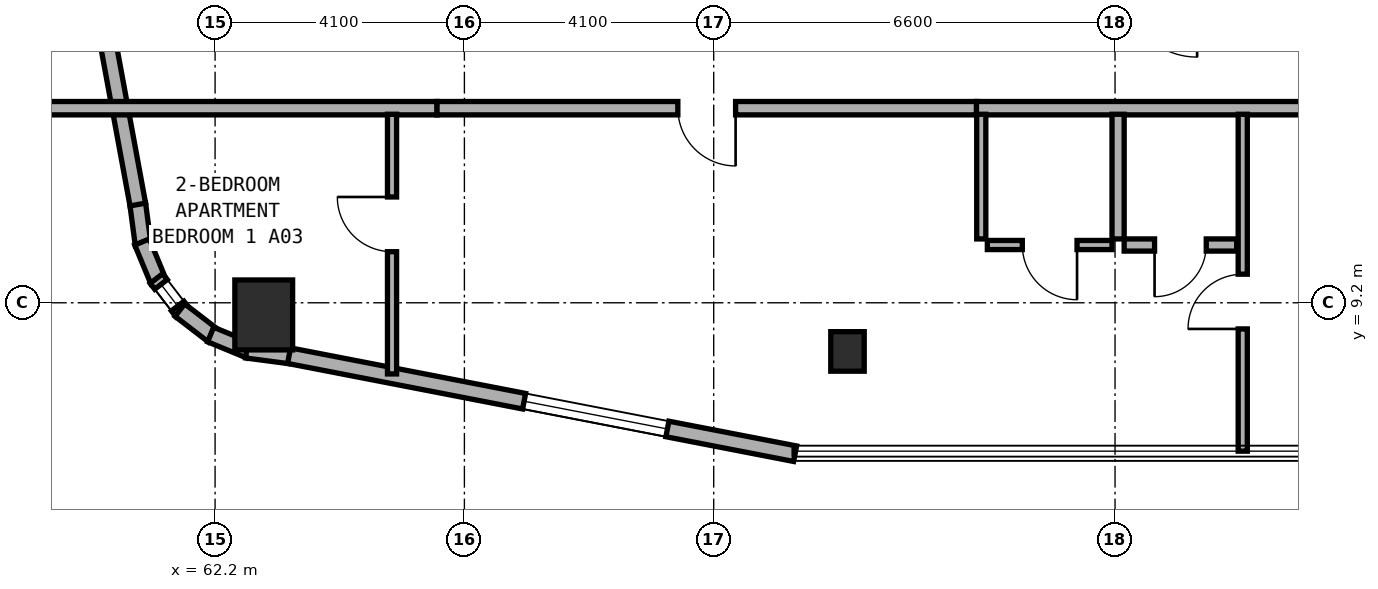
"""IFC4 building model, lengths in metres.
Left out: names, types, materials, properties, quantities, classifications, styles, units other than length and angle.
Written with IfcOpenShell. Run it as: python <this file> out.ifc"""

import sys

from ifc_helpers import new_model, si_unit, direction, frame, frame_2d, origin, origin_2d, place, context, subcontext, project, spatial, rectangle, extrude, element, fill, save


model = new_model("IFC4")
c1 = context("Model", 3, precision=1e-05, world=origin(), true_north=direction((0.0, 1.0)))
c2 = subcontext(c1, "Body", "Model", "MODEL_VIEW")
j1 = project(units=[si_unit("LENGTHUNIT", "METRE"), si_unit("PLANEANGLEUNIT", "RADIAN")], contexts=[c1])
p1 = place(None, origin())
s1 = spatial("IfcSite", under=j1, at=p1, CompositionType="ELEMENT")
p2 = place(p1, origin())
s2 = spatial("IfcBuilding", under=s1, at=p2, CompositionType="ELEMENT")
p3 = place(p2, frame((0.0, 0.0, 127.5)))
s3 = spatial("IfcBuildingStorey", under=s2, at=p3, CompositionType="ELEMENT", Elevation=127.5)
p4 = place(p3, frame((72.6, 8.4, 0.0), z_axis=(0.0, 0.0, 1.0), x_axis=(1.0, 0.0, 0.0)))
e1 = element("IfcColumn", 1, at=p4, inside=s3, PredefinedType="COLUMN", context=c2, shape_type="SweptSolid", body=[
    extrude(rectangle(XDim=0.55, YDim=0.65, at=origin_2d()), origin(), (0.0, 0.0, 1.0), 3.24),
])
p5 = place(p3, frame((63.0, 9.0, 0.0), z_axis=(0.0, 0.0, 1.0), x_axis=(1.0, 0.0, 0.0)))
e2 = element("IfcColumn", 2, at=p5, inside=s3, PredefinedType="COLUMN", context=c2, shape_type="SweptSolid", body=[
    extrude(rectangle(XDim=0.95, YDim=1.15, at=origin_2d()), origin(), (0.0, 0.0, 1.0), 3.24),
])
p6 = place(p3, frame((60.928, 10.825, 0.0), z_axis=(0.0, 0.0, 1.0), x_axis=(0.131667498923, -0.991293937098, 0.0)))
e3 = element("IfcWall", 3, at=p6, inside=s3, PredefinedType="STANDARD", context=c2, shape_type="SweptSolid", body=[
    extrude(rectangle(XDim=0.677, YDim=0.26, at=frame_2d((0.338, 0.0))), origin(), (0.0, 0.0, 1.0), 3.25),
])
p7 = place(p3, frame((60.999, 10.2, 0.0), z_axis=(0.0, 0.0, 1.0), x_axis=(0.381988976935, -0.924166879681, 0.0)))
e4 = element("IfcWall", 4, at=p7, inside=s3, PredefinedType="STANDARD", context=c2, shape_type="SweptSolid", body=[
    extrude(rectangle(XDim=0.693, YDim=0.26, at=frame_2d((0.347, 0.0))), origin(), (0.0, 0.0, 1.0), 3.25),
])
p8 = place(p3, frame((61.236, 9.599, 0.0), z_axis=(0.0, 0.0, 1.0), x_axis=(0.609472651958, -0.792807092876, 0.0)))
e5 = element("IfcWall", 5, at=p8, inside=s3, PredefinedType="STANDARD", context=c2, shape_type="SweptSolid", body=[
    extrude(rectangle(XDim=0.694, YDim=0.26, at=frame_2d((0.347, 0.0))), origin(), (0.0, 0.0, 1.0), 3.25),
])
p9 = place(p8, frame((0.122, 0.0, 0.85)))
e6 = element("IfcOpeningElement", 6, at=p9, cuts=e5, PredefinedType="OPENING", context=c2, shape_type="SweptSolid", body=[
    extrude(rectangle(XDim=0.45, YDim=1.5, at=frame_2d((0.225, 0.75))), frame((0.0, 0.14, 0.0), z_axis=(0.0, -1.0, 0.0), x_axis=(1.0, 0.0, 0.0)), (0.0, 0.0, 1.0), 0.28),
])
p10 = place(p3, frame((61.621, 9.08, 0.0), z_axis=(0.0, 0.0, 1.0), x_axis=(0.792506234191, -0.609863811657, 0.0)))
e7 = element("IfcWall", 7, at=p10, inside=s3, PredefinedType="STANDARD", context=c2, shape_type="SweptSolid", body=[
    extrude(rectangle(XDim=0.694, YDim=0.26, at=frame_2d((0.347, 0.0))), origin(), (0.0, 0.0, 1.0), 3.25),
])
p11 = place(p3, frame((62.127, 8.678, 0.0), z_axis=(0.0, 0.0, 1.0), x_axis=(0.92421822618, -0.381864727877, 0.0)))
e8 = element("IfcWall", 8, at=p11, inside=s3, PredefinedType="STANDARD", context=c2, shape_type="SweptSolid", body=[
    extrude(rectangle(XDim=0.694, YDim=0.26, at=frame_2d((0.347, 0.0))), origin(), (0.0, 0.0, 1.0), 3.25),
])
p12 = place(p3, frame((62.719, 8.421, 0.0), z_axis=(0.0, 0.0, 1.0), x_axis=(0.991433279471, -0.130614135366, 0.0)))
e9 = element("IfcWall", 9, at=p12, inside=s3, PredefinedType="STANDARD", context=c2, shape_type="SweptSolid", body=[
    extrude(rectangle(XDim=0.712, YDim=0.26, at=frame_2d((0.356, 0.0))), origin(), (0.0, 0.0, 1.0), 3.25),
])
p13 = place(p3, frame((63.417, 8.33, 0.0), z_axis=(0.0, 0.0, 1.0), x_axis=(0.981750199588, -0.190175039396, 0.0)))
e10 = element("IfcWall", 10, at=p13, inside=s3, PredefinedType="STANDARD", context=c2, shape_type="SweptSolid", body=[
    extrude(rectangle(XDim=8.477, YDim=0.26, at=frame_2d((4.238, 0.0))), origin(), (0.0, 0.0, 1.0), 3.25),
])
p14 = place(p13, frame((3.937, 0.0, 0.8)))
e11 = element("IfcOpeningElement", 11, at=p14, cuts=e10, PredefinedType="OPENING", context=c2, shape_type="SweptSolid", body=[
    extrude(rectangle(XDim=2.4, YDim=1.6, at=frame_2d((1.2, 0.8))), frame((0.0, 0.14, 0.0), z_axis=(0.0, -1.0, 0.0), x_axis=(1.0, 0.0, 0.0)), (0.0, 0.0, 1.0), 0.28),
])
p15 = place(p3, frame((59.318, 19.558, 0.0), z_axis=(0.0, 0.0, 1.0), x_axis=(0.181209963057, -0.983444431215, 0.0)))
e12 = element("IfcWall", 12, at=p15, inside=s3, PredefinedType="STANDARD", context=c2, shape_type="SweptSolid", body=[
    extrude(rectangle(XDim=8.889, YDim=0.26, at=frame_2d((4.445, 0.0))), origin(), (0.0, 0.0, 1.0), 3.25),
])
p16 = place(p15, frame((1.444, 0.0, 0.8)))
e13 = element("IfcOpeningElement", 13, at=p16, cuts=e12, PredefinedType="OPENING", context=c2, shape_type="SweptSolid", body=[
    extrude(rectangle(XDim=2.4, YDim=1.6, at=frame_2d((1.2, 0.8))), frame((0.0, 0.14, 0.0), z_axis=(0.0, -1.0, 0.0), x_axis=(1.0, 0.0, 0.0)), (0.0, 0.0, 1.0), 0.28),
])
p17 = place(p3, frame((59.36, 12.4, 0.0), z_axis=(0.0, 0.0, 1.0), x_axis=(1.0, 0.0, 0.0)))
e14 = element("IfcWall", 14, at=p17, inside=s3, PredefinedType="SOLIDWALL", context=c2, shape_type="SweptSolid", body=[
    extrude(rectangle(XDim=6.49, YDim=0.22, at=frame_2d((3.245, 0.0))), origin(), (0.0, 0.0, 1.0), 2.815),
])
p18 = place(p3, frame((74.72, 12.4, 0.0), z_axis=(0.0, 0.0, 1.0), x_axis=(1.0, 0.0, 0.0)))
e15 = element("IfcWall", 15, at=p18, inside=s3, PredefinedType="SOLIDWALL", context=c2, shape_type="SweptSolid", body=[
    extrude(rectangle(XDim=6.68, YDim=0.22, at=frame_2d((3.34, 0.0))), origin(), (0.0, 0.0, 1.0), 3.22),
])
p19 = place(p3, frame((65.85, 12.4, 0.0), z_axis=(0.0, 0.0, 1.0), x_axis=(1.0, 0.0, 0.0)))
e16 = element("IfcWall", 16, at=p19, inside=s3, PredefinedType="SOLIDWALL", context=c2, shape_type="SweptSolid", body=[
    extrude(rectangle(XDim=8.87, YDim=0.22, at=frame_2d((4.435, 0.0))), origin(), (0.0, 0.0, 1.0), 3.22),
])
p20 = place(p19, frame((3.96, 0.0, 0.0)))
e17 = element("IfcOpeningElement", 17, at=p20, cuts=e16, PredefinedType="OPENING", context=c2, shape_type="SweptSolid", body=[
    extrude(rectangle(XDim=0.95, YDim=2.1, at=frame_2d((0.475, 1.05))), frame((0.0, 0.12, 0.0), z_axis=(0.0, -1.0, 0.0), x_axis=(1.0, 0.0, 0.0)), (0.0, 0.0, 1.0), 0.24),
])
p21 = place(p3, frame((65.11, 8.03, 0.0), z_axis=(0.0, 0.0, 1.0), x_axis=(0.0, 1.0, 0.0)))
e18 = element("IfcWall", 18, at=p21, inside=s3, PredefinedType="PARTITIONING", context=c2, shape_type="SweptSolid", body=[
    extrude(rectangle(XDim=4.27, YDim=0.15, at=frame_2d((2.135, 0.0))), origin(), (0.0, 0.0, 1.0), 3.22),
])
p22 = place(p21, frame((2.01, 0.0, 0.0)))
e19 = element("IfcOpeningElement", 19, at=p22, cuts=e18, PredefinedType="OPENING", context=c2, shape_type="SweptSolid", body=[
    extrude(rectangle(XDim=0.9, YDim=2.1, at=frame_2d((0.45, 1.05))), frame((0.0, 0.085, 0.0), z_axis=(0.0, -1.0, 0.0), x_axis=(1.0, 0.0, 0.0)), (0.0, 0.0, 1.0), 0.17),
])
p23 = place(p3, frame((79.1, 6.76, 0.0), z_axis=(0.0, 0.0, 1.0), x_axis=(0.0, 1.0, 0.0)))
e20 = element("IfcWall", 20, at=p23, inside=s3, PredefinedType="PARTITIONING", context=c2, shape_type="SweptSolid", body=[
    extrude(rectangle(XDim=5.54, YDim=0.15, at=frame_2d((2.77, 0.0))), origin(), (0.0, 0.0, 1.0), 3.22),
])
p24 = place(p23, frame((2.01, 0.0, 0.0)))
e21 = element("IfcOpeningElement", 21, at=p24, cuts=e20, PredefinedType="OPENING", context=c2, shape_type="SweptSolid", body=[
    extrude(rectangle(XDim=0.9, YDim=2.1, at=frame_2d((0.45, 1.05))), frame((0.0, 0.085, 0.0), z_axis=(0.0, -1.0, 0.0), x_axis=(1.0, 0.0, 0.0)), (0.0, 0.0, 1.0), 0.17),
])
p25 = place(p3, frame((77.05, 10.25, 0.0), z_axis=(0.0, 0.0, 1.0), x_axis=(0.0, 1.0, 0.0)))
e22 = element("IfcWall", 22, at=p25, inside=s3, PredefinedType="PLUMBINGWALL", context=c2, shape_type="SweptSolid", body=[
    extrude(rectangle(XDim=2.05, YDim=0.2, at=frame_2d((1.025, 0.0))), origin(), (0.0, 0.0, 1.0), 3.22),
])
p26 = place(p3, frame((74.8, 10.25, 0.0), z_axis=(0.0, 0.0, 1.0), x_axis=(0.0, 1.0, 0.0)))
e23 = element("IfcWall", 23, at=p26, inside=s3, PredefinedType="PARTITIONING", context=c2, shape_type="SweptSolid", body=[
    extrude(rectangle(XDim=2.05, YDim=0.15, at=frame_2d((1.025, 0.0))), origin(), (0.0, 0.0, 1.0), 3.22),
])
p27 = place(p3, frame((77.15, 10.15, 0.0), z_axis=(0.0, 0.0, 1.0), x_axis=(1.0, 0.0, 0.0)))
e24 = element("IfcWall", 24, at=p27, inside=s3, PredefinedType="PLUMBINGWALL", context=c2, shape_type="SweptSolid", body=[
    extrude(rectangle(XDim=1.85, YDim=0.2, at=frame_2d((0.925, 0.0))), origin(), (0.0, 0.0, 1.0), 3.22),
])
p28 = place(p27, frame((0.5, 0.0, 0.0)))
e25 = element("IfcOpeningElement", 25, at=p28, cuts=e24, PredefinedType="OPENING", context=c2, shape_type="SweptSolid", body=[
    extrude(rectangle(XDim=0.85, YDim=2.1, at=frame_2d((0.425, 1.05))), frame((0.0, 0.11, 0.0), z_axis=(0.0, -1.0, 0.0), x_axis=(1.0, 0.0, 0.0)), (0.0, 0.0, 1.0), 0.22),
])
p29 = place(p3, frame((74.9, 10.15, 0.0), z_axis=(0.0, 0.0, 1.0), x_axis=(1.0, 0.0, 0.0)))
e26 = element("IfcWall", 26, at=p29, inside=s3, PredefinedType="PARTITIONING", context=c2, shape_type="SweptSolid", body=[
    extrude(rectangle(XDim=2.05, YDim=0.15, at=frame_2d((1.025, 0.0))), origin(), (0.0, 0.0, 1.0), 3.22),
])
p30 = place(p29, frame((0.575, 0.0, 0.0)))
e27 = element("IfcOpeningElement", 27, at=p30, cuts=e26, PredefinedType="OPENING", context=c2, shape_type="SweptSolid", body=[
    extrude(rectangle(XDim=0.9, YDim=2.1, at=frame_2d((0.45, 1.05))), frame((0.0, 0.085, 0.0), z_axis=(0.0, -1.0, 0.0), x_axis=(1.0, 0.0, 0.0)), (0.0, 0.0, 1.0), 0.17),
])
p31 = place(p14, origin())
e28 = element("IfcWindow", 28, at=p31, inside=s3, PartitioningType="SINGLE_PANEL", PredefinedType="WINDOW", context=c2, shape_type="SweptSolid", body=[
    extrude(rectangle(XDim=2.4, YDim=1.6, at=frame_2d((1.2, 0.8))), frame((0.0, 0.03, 0.0), z_axis=(0.0, -1.0, 0.0), x_axis=(1.0, 0.0, 0.0)), (0.0, 0.0, 1.0), 0.06),
])
fill(e11, e28)
p32 = place(p9, origin())
e29 = element("IfcWindow", 29, at=p32, inside=s3, PartitioningType="SINGLE_PANEL", PredefinedType="WINDOW", context=c2, shape_type="SweptSolid", body=[
    extrude(rectangle(XDim=0.45, YDim=1.5, at=frame_2d((0.225, 0.75))), frame((0.0, 0.03, 0.0), z_axis=(0.0, -1.0, 0.0), x_axis=(1.0, 0.0, 0.0)), (0.0, 0.0, 1.0), 0.06),
])
fill(e6, e29)
p33 = place(p20, frame((0.95, 0.0, 0.0), z_axis=(0.0, 0.0, 1.0), x_axis=(-1.0, 0.0, 0.0)))
e30 = element("IfcDoor", 30, at=p33, inside=s3, OperationType="SINGLE_SWING_LEFT", PredefinedType="DOOR", context=c2, shape_type="SweptSolid", body=[
    extrude(rectangle(XDim=0.95, YDim=2.1, at=frame_2d((0.475, 1.05))), frame((0.0, 0.025, 0.0), z_axis=(0.0, -1.0, 0.0), x_axis=(1.0, 0.0, 0.0)), (0.0, 0.0, 1.0), 0.05),
])
fill(e17, e30)
p34 = place(p22, origin())
e31 = element("IfcDoor", 31, at=p34, inside=s3, OperationType="SINGLE_SWING_RIGHT", PredefinedType="DOOR", context=c2, shape_type="SweptSolid", body=[
    extrude(rectangle(XDim=0.9, YDim=2.1, at=frame_2d((0.45, 1.05))), frame((0.0, 0.025, 0.0), z_axis=(0.0, -1.0, 0.0), x_axis=(1.0, 0.0, 0.0)), (0.0, 0.0, 1.0), 0.05),
])
fill(e19, e31)
p35 = place(p24, origin())
e32 = element("IfcDoor", 32, at=p35, inside=s3, OperationType="SINGLE_SWING_LEFT", PredefinedType="DOOR", context=c2, shape_type="SweptSolid", body=[
    extrude(rectangle(XDim=0.9, YDim=2.1, at=frame_2d((0.45, 1.05))), frame((0.0, 0.025, 0.0), z_axis=(0.0, -1.0, 0.0), x_axis=(1.0, 0.0, 0.0)), (0.0, 0.0, 1.0), 0.05),
])
fill(e21, e32)
p36 = place(p28, frame((0.85, 0.0, 0.0), z_axis=(0.0, 0.0, 1.0), x_axis=(-1.0, 0.0, 0.0)))
e33 = element("IfcDoor", 33, at=p36, inside=s3, OperationType="SINGLE_SWING_RIGHT", PredefinedType="DOOR", context=c2, shape_type="SweptSolid", body=[
    extrude(rectangle(XDim=0.85, YDim=2.1, at=frame_2d((0.425, 1.05))), frame((0.0, 0.025, 0.0), z_axis=(0.0, -1.0, 0.0), x_axis=(1.0, 0.0, 0.0)), (0.0, 0.0, 1.0), 0.05),
])
fill(e25, e33)
p37 = place(p30, frame((0.9, 0.0, 0.0), z_axis=(0.0, 0.0, 1.0), x_axis=(-1.0, 0.0, 0.0)))
e34 = element("IfcDoor", 34, at=p37, inside=s3, OperationType="SINGLE_SWING_LEFT", PredefinedType="DOOR", context=c2, shape_type="SweptSolid", body=[
    extrude(rectangle(XDim=0.9, YDim=2.1, at=frame_2d((0.45, 1.05))), frame((0.0, 0.025, 0.0), z_axis=(0.0, -1.0, 0.0), x_axis=(1.0, 0.0, 0.0)), (0.0, 0.0, 1.0), 0.05),
])
fill(e27, e34)
save(model, sys.argv[1])
